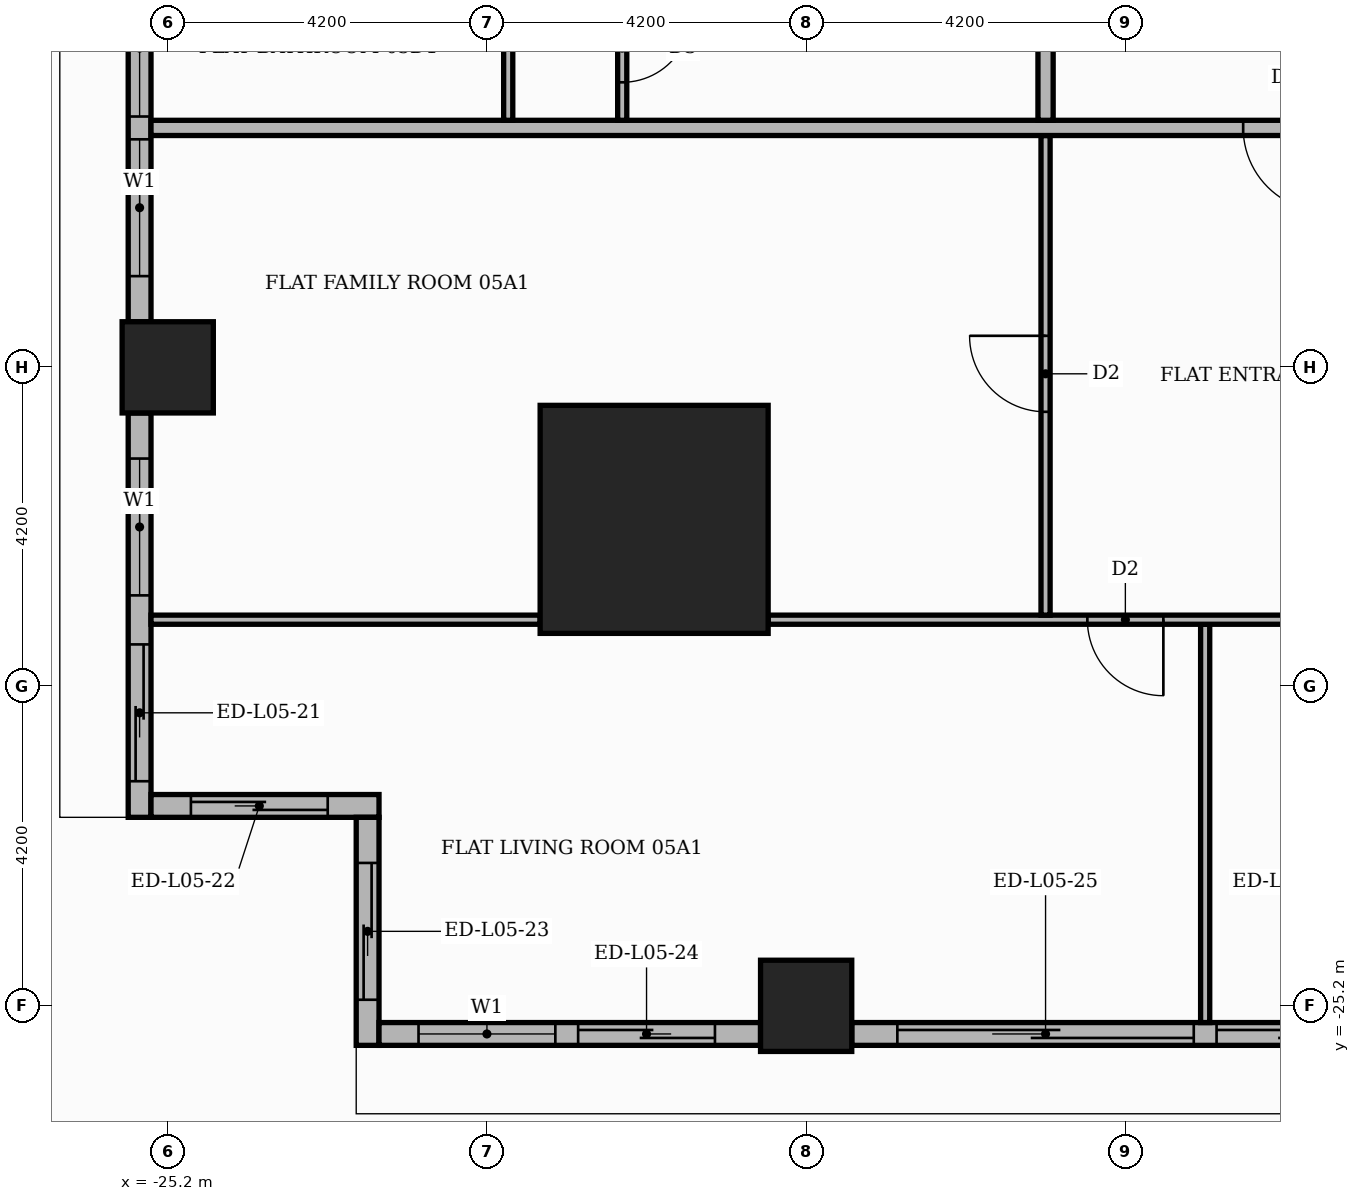
"""IFC4 building model, lengths in metres.
Left out: names, types, materials, properties, quantities, classifications, styles, units other than length and angle.
Written with IfcOpenShell. Run it as: python <this file> out.ifc"""

import sys

from ifc_helpers import new_model, si_unit, direction, frame, frame_2d, origin, origin_2d, place, context, subcontext, project, spatial, rectangle, extrude, element, fill, save


model = new_model("IFC4")
c1 = context("Model", 3, precision=1e-05, world=origin(), true_north=direction((0.0, 1.0)))
c2 = subcontext(c1, "Body", "Model", "MODEL_VIEW")
j1 = project(units=[si_unit("LENGTHUNIT", "METRE"), si_unit("PLANEANGLEUNIT", "RADIAN")], contexts=[c1])
p1 = place(None, origin())
s1 = spatial("IfcSite", under=j1, at=p1, CompositionType="ELEMENT")
p2 = place(p1, origin())
s2 = spatial("IfcBuilding", under=s1, at=p2, CompositionType="ELEMENT")
p3 = place(p2, frame((0.0, 0.0, 27.0)))
s3 = spatial("IfcBuildingStorey", under=s2, at=p3, CompositionType="ELEMENT", Elevation=27.0)
p4 = place(p3, frame((-18.8, -18.8, 0.0), z_axis=(0.0, 0.0, 1.0), x_axis=(1.0, 0.0, 0.0)))
e1 = element("IfcColumn", 1, at=p4, inside=s3, PredefinedType="COLUMN", context=c2, shape_type="SweptSolid", body=[
    extrude(rectangle(XDim=3.0, YDim=3.0, at=origin_2d()), origin(), (0.0, 0.0, 1.0), 3.9),
])
for number, where, z_axis, x_axis in (
    (2, (-16.8, -25.2, 0.0), (0.0, 0.0, 1.0), (1.0, 0.0, 0.0)),
    (3, (-25.2, -16.8, 0.0), (0.0, 0.0, 1.0), (1.0, 0.0, 0.0)),
):
    element("IfcColumn", number, at=place(p3, frame(where, z_axis=z_axis, x_axis=x_axis)), inside=s3, PredefinedType="COLUMN", context=c2, shape_type="SweptSolid", body=[
        extrude(rectangle(XDim=1.2, YDim=1.2, at=origin_2d()), origin(), (0.0, 0.0, 1.0), 3.9),
    ])
p5 = place(p3, frame((-25.57, -9.0, 0.0), z_axis=(0.0, 0.0, 1.0), x_axis=(0.0, -1.0, 0.0)))
e4 = element("IfcWall", 4, at=p5, inside=s3, PredefinedType="STANDARD", context=c2, shape_type="SweptSolid", body=[
    extrude(rectangle(XDim=7.2, YDim=0.3, at=frame_2d((3.6, 0.0))), origin(), (0.0, 0.0, 1.0), 3.48),
])
p6 = place(p5, frame((0.6, 0.0, 0.9)))
e5 = element("IfcOpeningElement", 5, at=p6, cuts=e4, PredefinedType="OPENING", context=c2, shape_type="SweptSolid", body=[
    extrude(rectangle(XDim=1.8, YDim=2.1, at=frame_2d((0.9, 1.05))), frame((0.0, 0.16, 0.0), z_axis=(0.0, -1.0, 0.0), x_axis=(1.0, 0.0, 0.0)), (0.0, 0.0, 1.0), 0.32),
])
p7 = place(p5, frame((2.7, 0.0, 0.9)))
e6 = element("IfcOpeningElement", 6, at=p7, cuts=e4, PredefinedType="OPENING", context=c2, shape_type="SweptSolid", body=[
    extrude(rectangle(XDim=1.8, YDim=2.1, at=frame_2d((0.9, 1.05))), frame((0.0, 0.16, 0.0), z_axis=(0.0, -1.0, 0.0), x_axis=(1.0, 0.0, 0.0)), (0.0, 0.0, 1.0), 0.32),
])
p8 = place(p5, frame((4.8, 0.0, 0.9)))
e7 = element("IfcOpeningElement", 7, at=p8, cuts=e4, PredefinedType="OPENING", context=c2, shape_type="SweptSolid", body=[
    extrude(rectangle(XDim=1.8, YDim=2.1, at=frame_2d((0.9, 1.05))), frame((0.0, 0.16, 0.0), z_axis=(0.0, -1.0, 0.0), x_axis=(1.0, 0.0, 0.0)), (0.0, 0.0, 1.0), 0.32),
])
p9 = place(p3, frame((-25.57, -17.4, 0.0), z_axis=(0.0, 0.0, 1.0), x_axis=(0.0, -1.0, 0.0)))
e8 = element("IfcWall", 8, at=p9, inside=s3, PredefinedType="STANDARD", context=c2, shape_type="SweptSolid", body=[
    extrude(rectangle(XDim=5.32, YDim=0.3, at=frame_2d((2.66, 0.0))), origin(), (0.0, 0.0, 1.0), 3.48),
])
p10 = place(p9, frame((0.6, 0.0, 0.9)))
e9 = element("IfcOpeningElement", 9, at=p10, cuts=e8, PredefinedType="OPENING", context=c2, shape_type="SweptSolid", body=[
    extrude(rectangle(XDim=1.8, YDim=2.1, at=frame_2d((0.9, 1.05))), frame((0.0, 0.16, 0.0), z_axis=(0.0, -1.0, 0.0), x_axis=(1.0, 0.0, 0.0)), (0.0, 0.0, 1.0), 0.32),
])
p11 = place(p9, frame((3.045, 0.0, 0.0)))
e10 = element("IfcOpeningElement", 10, at=p11, cuts=e8, PredefinedType="OPENING", context=c2, shape_type="SweptSolid", body=[
    extrude(rectangle(XDim=1.8, YDim=2.4, at=frame_2d((0.9, 1.2))), frame((0.0, 0.16, 0.0), z_axis=(0.0, -1.0, 0.0), x_axis=(1.0, 0.0, 0.0)), (0.0, 0.0, 1.0), 0.32),
])
p12 = place(p3, frame((-25.42, -22.57, 0.0), z_axis=(0.0, 0.0, 1.0), x_axis=(1.0, 0.0, 0.0)))
e11 = element("IfcWall", 11, at=p12, inside=s3, PredefinedType="STANDARD", context=c2, shape_type="SweptSolid", body=[
    extrude(rectangle(XDim=3.0, YDim=0.3, at=frame_2d((1.5, 0.0))), origin(), (0.0, 0.0, 1.0), 3.48),
])
p13 = place(p12, frame((0.525, 0.0, 0.0)))
e12 = element("IfcOpeningElement", 12, at=p13, cuts=e11, PredefinedType="OPENING", context=c2, shape_type="SweptSolid", body=[
    extrude(rectangle(XDim=1.8, YDim=2.4, at=frame_2d((0.9, 1.2))), frame((0.0, 0.16, 0.0), z_axis=(0.0, -1.0, 0.0), x_axis=(1.0, 0.0, 0.0)), (0.0, 0.0, 1.0), 0.32),
])
p14 = place(p3, frame((-22.57, -22.72, 0.0), z_axis=(0.0, 0.0, 1.0), x_axis=(0.0, -1.0, 0.0)))
e13 = element("IfcWall", 13, at=p14, inside=s3, PredefinedType="STANDARD", context=c2, shape_type="SweptSolid", body=[
    extrude(rectangle(XDim=3.0, YDim=0.3, at=frame_2d((1.5, 0.0))), origin(), (0.0, 0.0, 1.0), 3.48),
])
p15 = place(p14, frame((0.6, 0.0, 0.0)))
e14 = element("IfcOpeningElement", 14, at=p15, cuts=e13, PredefinedType="OPENING", context=c2, shape_type="SweptSolid", body=[
    extrude(rectangle(XDim=1.8, YDim=2.4, at=frame_2d((0.9, 1.2))), frame((0.0, 0.16, 0.0), z_axis=(0.0, -1.0, 0.0), x_axis=(1.0, 0.0, 0.0)), (0.0, 0.0, 1.0), 0.32),
])
p16 = place(p3, frame((-22.42, -25.57, 0.0), z_axis=(0.0, 0.0, 1.0), x_axis=(1.0, 0.0, 0.0)))
e15 = element("IfcWall", 15, at=p16, inside=s3, PredefinedType="STANDARD", context=c2, shape_type="SweptSolid", body=[
    extrude(rectangle(XDim=5.02, YDim=0.3, at=frame_2d((2.51, 0.0))), origin(), (0.0, 0.0, 1.0), 3.48),
])
p17 = place(p16, frame((0.52, 0.0, 0.9)))
e16 = element("IfcOpeningElement", 16, at=p17, cuts=e15, PredefinedType="OPENING", context=c2, shape_type="SweptSolid", body=[
    extrude(rectangle(XDim=1.8, YDim=2.1, at=frame_2d((0.9, 1.05))), frame((0.0, 0.16, 0.0), z_axis=(0.0, -1.0, 0.0), x_axis=(1.0, 0.0, 0.0)), (0.0, 0.0, 1.0), 0.32),
])
p18 = place(p16, frame((2.62, 0.0, 0.0)))
e17 = element("IfcOpeningElement", 17, at=p18, cuts=e15, PredefinedType="OPENING", context=c2, shape_type="SweptSolid", body=[
    extrude(rectangle(XDim=1.8, YDim=2.4, at=frame_2d((0.9, 1.2))), frame((0.0, 0.16, 0.0), z_axis=(0.0, -1.0, 0.0), x_axis=(1.0, 0.0, 0.0)), (0.0, 0.0, 1.0), 0.32),
])
p19 = place(p3, frame((-16.2, -25.57, 0.0), z_axis=(0.0, 0.0, 1.0), x_axis=(1.0, 0.0, 0.0)))
e18 = element("IfcWall", 18, at=p19, inside=s3, PredefinedType="STANDARD", context=c2, shape_type="SweptSolid", body=[
    extrude(rectangle(XDim=7.2, YDim=0.3, at=frame_2d((3.6, 0.0))), origin(), (0.0, 0.0, 1.0), 3.48),
])
p20 = place(p19, frame((0.6, 0.0, 0.0)))
e19 = element("IfcOpeningElement", 19, at=p20, cuts=e18, PredefinedType="OPENING", context=c2, shape_type="SweptSolid", body=[
    extrude(rectangle(XDim=3.9, YDim=2.4, at=frame_2d((1.95, 1.2))), frame((0.0, 0.16, 0.0), z_axis=(0.0, -1.0, 0.0), x_axis=(1.0, 0.0, 0.0)), (0.0, 0.0, 1.0), 0.32),
])
p21 = place(p19, frame((4.8, 0.0, 0.0)))
e20 = element("IfcOpeningElement", 20, at=p21, cuts=e18, PredefinedType="OPENING", context=c2, shape_type="SweptSolid", body=[
    extrude(rectangle(XDim=1.8, YDim=2.4, at=frame_2d((0.9, 1.2))), frame((0.0, 0.16, 0.0), z_axis=(0.0, -1.0, 0.0), x_axis=(1.0, 0.0, 0.0)), (0.0, 0.0, 1.0), 0.32),
])
p22 = place(p3, frame((-11.55, -25.42, 0.0), z_axis=(0.0, 0.0, 1.0), x_axis=(0.0, 1.0, 0.0)))
e21 = element("IfcWall", 21, at=p22, inside=s3, PredefinedType="PARTITIONING", context=c2, shape_type="SweptSolid", body=[
    extrude(rectangle(XDim=5.24, YDim=0.12, at=frame_2d((2.62, 0.0))), origin(), (0.0, 0.0, 1.0), 3.48),
])
p23 = place(p3, frame((-25.42, -20.12, 0.0), z_axis=(0.0, 0.0, 1.0), x_axis=(1.0, 0.0, 0.0)))
e22 = element("IfcWall", 22, at=p23, inside=s3, PredefinedType="PARTITIONING", context=c2, shape_type="SweptSolid", body=[
    extrude(rectangle(XDim=5.12, YDim=0.12, at=frame_2d((2.56, 0.0))), origin(), (0.0, 0.0, 1.0), 3.48),
])
p24 = place(p3, frame((-17.3, -20.12, 0.0), z_axis=(0.0, 0.0, 1.0), x_axis=(1.0, 0.0, 0.0)))
e23 = element("IfcWall", 23, at=p24, inside=s3, PredefinedType="PARTITIONING", context=c2, shape_type="SweptSolid", body=[
    extrude(rectangle(XDim=14.15, YDim=0.12, at=frame_2d((7.075, 0.0))), origin(), (0.0, 0.0, 1.0), 3.48),
])
p25 = place(p24, frame((4.2, 0.0, 0.0)))
e24 = element("IfcOpeningElement", 24, at=p25, cuts=e23, PredefinedType="OPENING", context=c2, shape_type="SweptSolid", body=[
    extrude(rectangle(XDim=1.0, YDim=2.1, at=frame_2d((0.5, 1.05))), frame((0.0, 0.07, 0.0), z_axis=(0.0, -1.0, 0.0), x_axis=(1.0, 0.0, 0.0)), (0.0, 0.0, 1.0), 0.14),
])
p26 = place(p24, frame((7.4, 0.0, 0.0)))
e25 = element("IfcOpeningElement", 25, at=p26, cuts=e23, PredefinedType="OPENING", context=c2, shape_type="SweptSolid", body=[
    extrude(rectangle(XDim=0.9, YDim=2.1, at=frame_2d((0.45, 1.05))), frame((0.0, 0.07, 0.0), z_axis=(0.0, -1.0, 0.0), x_axis=(1.0, 0.0, 0.0)), (0.0, 0.0, 1.0), 0.14),
])
p27 = place(p3, frame((-13.65, -20.06, 0.0), z_axis=(0.0, 0.0, 1.0), x_axis=(0.0, 1.0, 0.0)))
e26 = element("IfcWall", 26, at=p27, inside=s3, PredefinedType="PARTITIONING", context=c2, shape_type="SweptSolid", body=[
    extrude(rectangle(XDim=6.31, YDim=0.12, at=frame_2d((3.155, 0.0))), origin(), (0.0, 0.0, 1.0), 3.48),
])
p28 = place(p27, frame((2.675, 0.0, 0.0)))
e27 = element("IfcOpeningElement", 27, at=p28, cuts=e26, PredefinedType="OPENING", context=c2, shape_type="SweptSolid", body=[
    extrude(rectangle(XDim=1.0, YDim=2.1, at=frame_2d((0.5, 1.05))), frame((0.0, 0.07, 0.0), z_axis=(0.0, -1.0, 0.0), x_axis=(1.0, 0.0, 0.0)), (0.0, 0.0, 1.0), 0.14),
])
p29 = place(p3, frame((-25.42, -13.65, 0.0), z_axis=(0.0, 0.0, 1.0), x_axis=(1.0, 0.0, 0.0)))
e28 = element("IfcWall", 28, at=p29, inside=s3, PredefinedType="PARTITIONING", context=c2, shape_type="SweptSolid", body=[
    extrude(rectangle(XDim=39.07, YDim=0.2, at=frame_2d((19.535, 0.0))), origin(), (0.0, 0.0, 1.0), 3.48),
])
p30 = place(p29, frame((14.37, 0.0, 0.0)))
e29 = element("IfcOpeningElement", 29, at=p30, cuts=e28, PredefinedType="OPENING", context=c2, shape_type="SweptSolid", body=[
    extrude(rectangle(XDim=1.1, YDim=2.4, at=frame_2d((0.55, 1.2))), frame((0.0, 0.11, 0.0), z_axis=(0.0, -1.0, 0.0), x_axis=(1.0, 0.0, 0.0)), (0.0, 0.0, 1.0), 0.22),
])
p31 = place(p3, frame((-20.72, -13.55, 0.0), z_axis=(0.0, 0.0, 1.0), x_axis=(0.0, 1.0, 0.0)))
e30 = element("IfcWall", 30, at=p31, inside=s3, PredefinedType="PARTITIONING", context=c2, shape_type="SweptSolid", body=[
    extrude(rectangle(XDim=1.94, YDim=0.12, at=frame_2d((0.97, 0.0))), origin(), (0.0, 0.0, 1.0), 3.48),
])
p32 = place(p3, frame((-19.22, -13.55, 0.0), z_axis=(0.0, 0.0, 1.0), x_axis=(0.0, 1.0, 0.0)))
e31 = element("IfcWall", 31, at=p32, inside=s3, PredefinedType="PARTITIONING", context=c2, shape_type="SweptSolid", body=[
    extrude(rectangle(XDim=1.94, YDim=0.12, at=frame_2d((0.97, 0.0))), origin(), (0.0, 0.0, 1.0), 3.48),
])
p33 = place(p32, frame((0.5, 0.0, 0.0)))
e32 = element("IfcOpeningElement", 32, at=p33, cuts=e31, PredefinedType="OPENING", context=c2, shape_type="SweptSolid", body=[
    extrude(rectangle(XDim=0.9, YDim=2.1, at=frame_2d((0.45, 1.05))), frame((0.0, 0.07, 0.0), z_axis=(0.0, -1.0, 0.0), x_axis=(1.0, 0.0, 0.0)), (0.0, 0.0, 1.0), 0.14),
])
p34 = place(p3, frame((-13.65, -13.55, 0.0), z_axis=(0.0, 0.0, 1.0), x_axis=(0.0, 1.0, 0.0)))
e33 = element("IfcWall", 33, at=p34, inside=s3, PredefinedType="PARTITIONING", context=c2, shape_type="SweptSolid", body=[
    extrude(rectangle(XDim=27.1, YDim=0.2, at=frame_2d((13.55, 0.0))), origin(), (0.0, 0.0, 1.0), 3.48),
])
p35 = place(p34, frame((24.55, 0.0, 0.0)))
e34 = element("IfcOpeningElement", 34, at=p35, cuts=e33, PredefinedType="OPENING", context=c2, shape_type="SweptSolid", body=[
    extrude(rectangle(XDim=1.1, YDim=2.4, at=frame_2d((0.55, 1.2))), frame((0.0, 0.11, 0.0), z_axis=(0.0, -1.0, 0.0), x_axis=(1.0, 0.0, 0.0)), (0.0, 0.0, 1.0), 0.22),
])
p36 = place(p7, origin())
e35 = element("IfcWindow", 35, at=p36, inside=s3, PartitioningType="SINGLE_PANEL", PredefinedType="WINDOW", context=c2, shape_type="SweptSolid", body=[
    extrude(rectangle(XDim=1.8, YDim=2.1, at=frame_2d((0.9, 1.05))), frame((0.0, 0.03, 0.0), z_axis=(0.0, -1.0, 0.0), x_axis=(1.0, 0.0, 0.0)), (0.0, 0.0, 1.0), 0.06),
])
fill(e6, e35)
p37 = place(p8, origin())
e36 = element("IfcWindow", 36, at=p37, inside=s3, PartitioningType="SINGLE_PANEL", PredefinedType="WINDOW", context=c2, shape_type="SweptSolid", body=[
    extrude(rectangle(XDim=1.8, YDim=2.1, at=frame_2d((0.9, 1.05))), frame((0.0, 0.03, 0.0), z_axis=(0.0, -1.0, 0.0), x_axis=(1.0, 0.0, 0.0)), (0.0, 0.0, 1.0), 0.06),
])
fill(e7, e36)
p38 = place(p10, origin())
e37 = element("IfcWindow", 37, at=p38, inside=s3, PartitioningType="SINGLE_PANEL", PredefinedType="WINDOW", context=c2, shape_type="SweptSolid", body=[
    extrude(rectangle(XDim=1.8, YDim=2.1, at=frame_2d((0.9, 1.05))), frame((0.0, 0.03, 0.0), z_axis=(0.0, -1.0, 0.0), x_axis=(1.0, 0.0, 0.0)), (0.0, 0.0, 1.0), 0.06),
])
fill(e9, e37)
p39 = place(p11, origin())
e38 = element("IfcDoor", 38, at=p39, inside=s3, OperationType="SLIDING_TO_RIGHT", PredefinedType="DOOR", context=c2, shape_type="SweptSolid", body=[
    extrude(rectangle(XDim=1.8, YDim=2.4, at=frame_2d((0.9, 1.2))), frame((0.0, 0.025, 0.0), z_axis=(0.0, -1.0, 0.0), x_axis=(1.0, 0.0, 0.0)), (0.0, 0.0, 1.0), 0.05),
])
fill(e10, e38)
p40 = place(p13, origin())
e39 = element("IfcDoor", 39, at=p40, inside=s3, OperationType="SLIDING_TO_LEFT", PredefinedType="DOOR", context=c2, shape_type="SweptSolid", body=[
    extrude(rectangle(XDim=1.8, YDim=2.4, at=frame_2d((0.9, 1.2))), frame((0.0, 0.025, 0.0), z_axis=(0.0, -1.0, 0.0), x_axis=(1.0, 0.0, 0.0)), (0.0, 0.0, 1.0), 0.05),
])
fill(e12, e39)
p41 = place(p15, origin())
e40 = element("IfcDoor", 40, at=p41, inside=s3, OperationType="SLIDING_TO_RIGHT", PredefinedType="DOOR", context=c2, shape_type="SweptSolid", body=[
    extrude(rectangle(XDim=1.8, YDim=2.4, at=frame_2d((0.9, 1.2))), frame((0.0, 0.025, 0.0), z_axis=(0.0, -1.0, 0.0), x_axis=(1.0, 0.0, 0.0)), (0.0, 0.0, 1.0), 0.05),
])
fill(e14, e40)
p42 = place(p17, origin())
e41 = element("IfcWindow", 41, at=p42, inside=s3, PartitioningType="SINGLE_PANEL", PredefinedType="WINDOW", context=c2, shape_type="SweptSolid", body=[
    extrude(rectangle(XDim=1.8, YDim=2.1, at=frame_2d((0.9, 1.05))), frame((0.0, 0.03, 0.0), z_axis=(0.0, -1.0, 0.0), x_axis=(1.0, 0.0, 0.0)), (0.0, 0.0, 1.0), 0.06),
])
fill(e16, e41)
p43 = place(p18, origin())
e42 = element("IfcDoor", 42, at=p43, inside=s3, OperationType="SLIDING_TO_RIGHT", PredefinedType="DOOR", context=c2, shape_type="SweptSolid", body=[
    extrude(rectangle(XDim=1.8, YDim=2.4, at=frame_2d((0.9, 1.2))), frame((0.0, 0.025, 0.0), z_axis=(0.0, -1.0, 0.0), x_axis=(1.0, 0.0, 0.0)), (0.0, 0.0, 1.0), 0.05),
])
fill(e17, e42)
p44 = place(p20, origin())
e43 = element("IfcDoor", 43, at=p44, inside=s3, OperationType="SLIDING_TO_LEFT", PredefinedType="DOOR", context=c2, shape_type="SweptSolid", body=[
    extrude(rectangle(XDim=3.9, YDim=2.4, at=frame_2d((1.95, 1.2))), frame((0.0, 0.025, 0.0), z_axis=(0.0, -1.0, 0.0), x_axis=(1.0, 0.0, 0.0)), (0.0, 0.0, 1.0), 0.05),
])
fill(e19, e43)
p45 = place(p21, origin())
e44 = element("IfcDoor", 44, at=p45, inside=s3, OperationType="SLIDING_TO_RIGHT", PredefinedType="DOOR", context=c2, shape_type="SweptSolid", body=[
    extrude(rectangle(XDim=1.8, YDim=2.4, at=frame_2d((0.9, 1.2))), frame((0.0, 0.025, 0.0), z_axis=(0.0, -1.0, 0.0), x_axis=(1.0, 0.0, 0.0)), (0.0, 0.0, 1.0), 0.05),
])
fill(e20, e44)
p46 = place(p30, frame((1.1, 0.0, 0.0), z_axis=(0.0, 0.0, 1.0), x_axis=(-1.0, 0.0, 0.0)))
e45 = element("IfcDoor", 45, at=p46, inside=s3, OperationType="SINGLE_SWING_RIGHT", PredefinedType="DOOR", context=c2, shape_type="SweptSolid", body=[
    extrude(rectangle(XDim=1.1, YDim=2.4, at=frame_2d((0.55, 1.2))), frame((0.0, 0.025, 0.0), z_axis=(0.0, -1.0, 0.0), x_axis=(1.0, 0.0, 0.0)), (0.0, 0.0, 1.0), 0.05),
])
fill(e29, e45)
p47 = place(p28, origin())
e46 = element("IfcDoor", 46, at=p47, inside=s3, OperationType="SINGLE_SWING_RIGHT", PredefinedType="DOOR", context=c2, shape_type="SweptSolid", body=[
    extrude(rectangle(XDim=1.0, YDim=2.1, at=frame_2d((0.5, 1.05))), frame((0.0, 0.025, 0.0), z_axis=(0.0, -1.0, 0.0), x_axis=(1.0, 0.0, 0.0)), (0.0, 0.0, 1.0), 0.05),
])
fill(e27, e46)
p48 = place(p25, frame((1.0, 0.0, 0.0), z_axis=(0.0, 0.0, 1.0), x_axis=(-1.0, 0.0, 0.0)))
e47 = element("IfcDoor", 47, at=p48, inside=s3, OperationType="SINGLE_SWING_RIGHT", PredefinedType="DOOR", context=c2, shape_type="SweptSolid", body=[
    extrude(rectangle(XDim=1.0, YDim=2.1, at=frame_2d((0.5, 1.05))), frame((0.0, 0.025, 0.0), z_axis=(0.0, -1.0, 0.0), x_axis=(1.0, 0.0, 0.0)), (0.0, 0.0, 1.0), 0.05),
])
fill(e24, e47)
p49 = place(p33, frame((0.9, 0.0, 0.0), z_axis=(0.0, 0.0, 1.0), x_axis=(-1.0, 0.0, 0.0)))
e48 = element("IfcDoor", 48, at=p49, inside=s3, OperationType="SINGLE_SWING_RIGHT", PredefinedType="DOOR", context=c2, shape_type="SweptSolid", body=[
    extrude(rectangle(XDim=0.9, YDim=2.1, at=frame_2d((0.45, 1.05))), frame((0.0, 0.025, 0.0), z_axis=(0.0, -1.0, 0.0), x_axis=(1.0, 0.0, 0.0)), (0.0, 0.0, 1.0), 0.05),
])
fill(e32, e48)
save(model, sys.argv[1])
